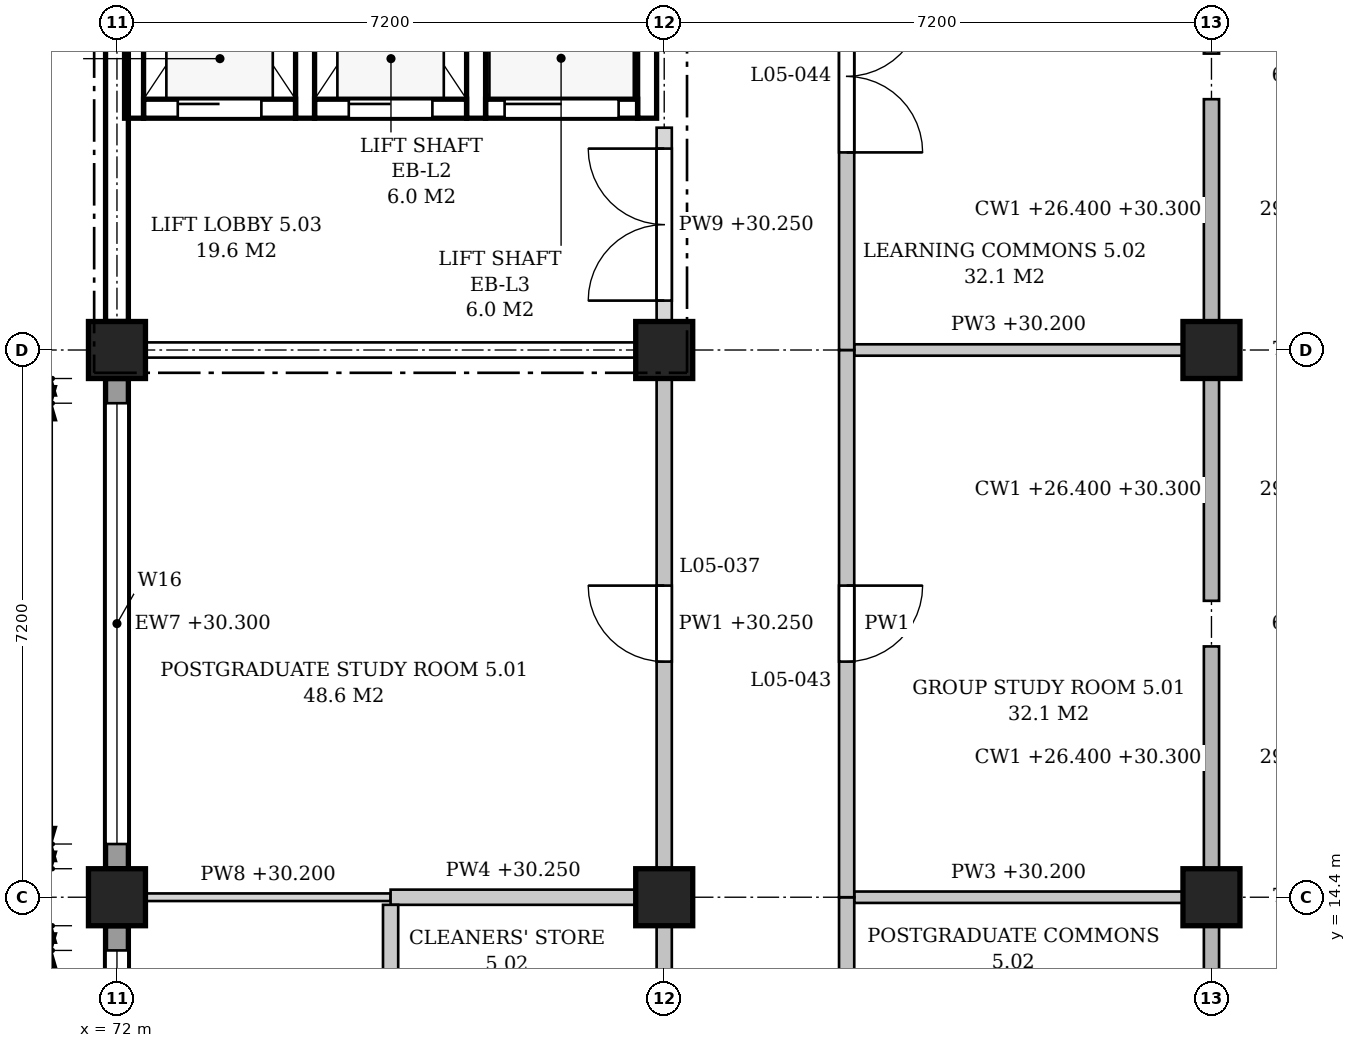
"""IFC4 building model, lengths in metres.
Left out: names, types, materials, properties, quantities, classifications, styles, units other than length and angle.
Written with IfcOpenShell. Run it as: python <this file> out.ifc"""

import sys

from ifc_helpers import new_model, si_unit, direction, frame, frame_2d, origin, origin_2d, place, context, subcontext, project, spatial, polyline, rectangle, outline, extrude, element, fill, save


model = new_model("IFC4")
c1 = context("Model", 3, precision=1e-05, world=origin(), true_north=direction((0.0, 1.0)))
c2 = subcontext(c1, "Body", "Model", "MODEL_VIEW")
j1 = project(units=[si_unit("LENGTHUNIT", "METRE"), si_unit("PLANEANGLEUNIT", "RADIAN")], contexts=[c1])
p1 = place(None, origin())
s1 = spatial("IfcSite", under=j1, at=p1, CompositionType="ELEMENT")
p2 = place(p1, origin())
s2 = spatial("IfcBuilding", under=s1, at=p2, CompositionType="ELEMENT")
p3 = place(p2, frame((0.0, 0.0, 26.4)))
s3 = spatial("IfcBuildingStorey", under=s2, at=p3, CompositionType="ELEMENT", Elevation=26.4)
for number, where, z_axis, x_axis in (
    (1, (72.0, 14.4, 0.0), (0.0, 0.0, 1.0), (1.0, 0.0, 0.0)),
    (2, (72.0, 21.6, 0.0), (0.0, 0.0, 1.0), (1.0, 0.0, 0.0)),
    (3, (79.2, 14.4, 0.0), (0.0, 0.0, 1.0), (1.0, 0.0, 0.0)),
    (4, (79.2, 21.6, 0.0), (0.0, 0.0, 1.0), (1.0, 0.0, 0.0)),
    (5, (86.4, 14.4, 0.0), (0.0, 0.0, 1.0), (1.0, 0.0, 0.0)),
    (6, (86.4, 21.6, 0.0), (0.0, 0.0, 1.0), (1.0, 0.0, 0.0)),
):
    element("IfcColumn", number, at=place(p3, frame(where, z_axis=z_axis, x_axis=x_axis)), inside=s3, PredefinedType="COLUMN", context=c2, shape_type="SweptSolid", body=[
        extrude(rectangle(XDim=0.75, YDim=0.75, at=origin_2d()), origin(), (0.0, 0.0, 1.0), 4.8),
    ])
p4 = place(p3, frame((72.0, 7.575, 0.0), z_axis=(0.0, 0.0, 1.0), x_axis=(0.0, 1.0, 0.0)))
e7 = element("IfcWall", 7, at=p4, inside=s3, PredefinedType="STANDARD", context=c2, shape_type="SweptSolid", body=[
    extrude(rectangle(XDim=6.45, YDim=0.3, at=frame_2d((3.225, 0.0))), origin(), (0.0, 0.0, 1.0), 3.9),
])
p5 = place(p4, frame((0.325, 0.0, 1.5)))
e8 = element("IfcOpeningElement", 8, at=p5, cuts=e7, PredefinedType="OPENING", context=c2, shape_type="SweptSolid", body=[
    extrude(outline(polyline([(0.0, 0.0), (5.8, 0.0), (5.8, 0.4), (2.9, 1.9), (0.0, 0.4), (0.0, 0.0)])), frame((0.0, 0.16, 0.0), z_axis=(0.0, -1.0, 0.0), x_axis=(1.0, 0.0, 0.0)), (0.0, 0.0, 1.0), 0.32),
])
p6 = place(p3, frame((72.0, 14.775, 0.0), z_axis=(0.0, 0.0, 1.0), x_axis=(0.0, 1.0, 0.0)))
e9 = element("IfcWall", 9, at=p6, inside=s3, PredefinedType="STANDARD", context=c2, shape_type="SweptSolid", body=[
    extrude(rectangle(XDim=6.45, YDim=0.3, at=frame_2d((3.225, 0.0))), origin(), (0.0, 0.0, 1.0), 3.9),
])
p7 = place(p6, frame((0.325, 0.0, 1.5)))
e10 = element("IfcOpeningElement", 10, at=p7, cuts=e9, PredefinedType="OPENING", context=c2, shape_type="SweptSolid", body=[
    extrude(outline(polyline([(0.0, 0.0), (5.8, 0.0), (5.8, 0.4), (2.9, 1.9), (0.0, 0.4), (0.0, 0.0)])), frame((0.0, 0.16, 0.0), z_axis=(0.0, -1.0, 0.0), x_axis=(1.0, 0.0, 0.0)), (0.0, 0.0, 1.0), 0.32),
])
p8 = place(p3, frame((72.0, 21.975, 0.0), z_axis=(0.0, 0.0, 1.0), x_axis=(0.0, 1.0, 0.0)))
e11 = element("IfcWall", 11, at=p8, inside=s3, PredefinedType="STANDARD", context=c2, shape_type="SweptSolid", body=[
    extrude(rectangle(XDim=6.45, YDim=0.3, at=frame_2d((3.225, 0.0))), origin(), (0.0, 0.0, 1.0), 3.9),
])
p9 = place(p3, frame((72.225, 24.65, -0.25), z_axis=(0.0, 0.0, 1.0), x_axis=(0.0, 1.0, 0.0)))
e12 = element("IfcWall", 12, at=p9, inside=s3, PredefinedType="SHEAR", context=c2, shape_type="SweptSolid", body=[
    extrude(rectangle(XDim=3.775, YDim=0.25, at=frame_2d((1.888, 0.0))), origin(), (0.0, 0.0, 1.0), 4.75),
])
for number, where, z_axis, x_axis in (
    (13, (74.475, 24.65, -0.25), (0.0, 0.0, 1.0), (0.0, 1.0, 0.0)),
    (14, (76.725, 24.65, -0.25), (0.0, 0.0, 1.0), (0.0, 1.0, 0.0)),
):
    element("IfcWall", number, at=place(p3, frame(where, z_axis=z_axis, x_axis=x_axis)), inside=s3, PredefinedType="SHEAR", context=c2, shape_type="SweptSolid", body=[
        extrude(rectangle(XDim=3.5, YDim=0.25, at=frame_2d((1.75, 0.0))), origin(), (0.0, 0.0, 1.0), 4.75),
    ])
p10 = place(p3, frame((78.975, 24.65, -0.25), z_axis=(0.0, 0.0, 1.0), x_axis=(0.0, 1.0, 0.0)))
e15 = element("IfcWall", 15, at=p10, inside=s3, PredefinedType="SHEAR", context=c2, shape_type="SweptSolid", body=[
    extrude(rectangle(XDim=3.775, YDim=0.25, at=frame_2d((1.888, 0.0))), origin(), (0.0, 0.0, 1.0), 4.75),
])
p11 = place(p3, frame((72.35, 24.775, -0.25), z_axis=(0.0, 0.0, 1.0), x_axis=(1.0, 0.0, 0.0)))
e16 = element("IfcWall", 16, at=p11, inside=s3, PredefinedType="SHEAR", context=c2, shape_type="SweptSolid", body=[
    extrude(rectangle(XDim=2.0, YDim=0.25, at=frame_2d((1.0, 0.0))), origin(), (0.0, 0.0, 1.0), 4.75),
])
p12 = place(p11, frame((0.45, 0.0, 0.25)))
e17 = element("IfcOpeningElement", 17, at=p12, cuts=e16, PredefinedType="OPENING", context=c2, shape_type="SweptSolid", body=[
    extrude(rectangle(XDim=1.1, YDim=2.1, at=frame_2d((0.55, 1.05))), frame((0.0, 0.135, 0.0), z_axis=(0.0, -1.0, 0.0), x_axis=(1.0, 0.0, 0.0)), (0.0, 0.0, 1.0), 0.27),
])
p13 = place(p3, frame((74.6, 24.775, -0.25), z_axis=(0.0, 0.0, 1.0), x_axis=(1.0, 0.0, 0.0)))
e18 = element("IfcWall", 18, at=p13, inside=s3, PredefinedType="SHEAR", context=c2, shape_type="SweptSolid", body=[
    extrude(rectangle(XDim=2.0, YDim=0.25, at=frame_2d((1.0, 0.0))), origin(), (0.0, 0.0, 1.0), 4.75),
])
p14 = place(p13, frame((0.45, 0.0, 0.25)))
e19 = element("IfcOpeningElement", 19, at=p14, cuts=e18, PredefinedType="OPENING", context=c2, shape_type="SweptSolid", body=[
    extrude(rectangle(XDim=1.1, YDim=2.1, at=frame_2d((0.55, 1.05))), frame((0.0, 0.135, 0.0), z_axis=(0.0, -1.0, 0.0), x_axis=(1.0, 0.0, 0.0)), (0.0, 0.0, 1.0), 0.27),
])
p15 = place(p3, frame((76.85, 24.775, -0.25), z_axis=(0.0, 0.0, 1.0), x_axis=(1.0, 0.0, 0.0)))
e20 = element("IfcWall", 20, at=p15, inside=s3, PredefinedType="SHEAR", context=c2, shape_type="SweptSolid", body=[
    extrude(rectangle(XDim=2.0, YDim=0.25, at=frame_2d((1.0, 0.0))), origin(), (0.0, 0.0, 1.0), 4.75),
])
p16 = place(p15, frame((0.25, 0.0, 0.25)))
e21 = element("IfcOpeningElement", 21, at=p16, cuts=e20, PredefinedType="OPENING", context=c2, shape_type="SweptSolid", body=[
    extrude(rectangle(XDim=1.5, YDim=2.1, at=frame_2d((0.75, 1.05))), frame((0.0, 0.135, 0.0), z_axis=(0.0, -1.0, 0.0), x_axis=(1.0, 0.0, 0.0)), (0.0, 0.0, 1.0), 0.27),
])
p17 = place(p3, frame((72.375, 14.4, 0.0), z_axis=(0.0, 0.0, 1.0), x_axis=(1.0, 0.0, 0.0)))
e22 = element("IfcWall", 22, at=p17, inside=s3, PredefinedType="PARTITIONING", context=c2, shape_type="SweptSolid", body=[
    extrude(rectangle(XDim=3.225, YDim=0.1, at=frame_2d((1.613, 0.0))), origin(), (0.0, 0.0, 1.0), 3.8),
])
p18 = place(p3, frame((75.6, 14.4, 0.0), z_axis=(0.0, 0.0, 1.0), x_axis=(1.0, 0.0, 0.0)))
e23 = element("IfcWall", 23, at=p18, inside=s3, PredefinedType="PARTITIONING", context=c2, shape_type="SweptSolid", body=[
    extrude(rectangle(XDim=3.225, YDim=0.2, at=frame_2d((1.612, 0.0))), origin(), (0.0, 0.0, 1.0), 3.85),
])
p19 = place(p3, frame((81.7, 14.4, 0.0), z_axis=(0.0, 0.0, 1.0), x_axis=(1.0, 0.0, 0.0)))
e24 = element("IfcWall", 24, at=p19, inside=s3, PredefinedType="PARTITIONING", context=c2, shape_type="SweptSolid", body=[
    extrude(rectangle(XDim=4.325, YDim=0.15, at=frame_2d((2.163, 0.0))), origin(), (0.0, 0.0, 1.0), 3.8),
])
p20 = place(p3, frame((72.375, 21.6, 0.0), z_axis=(0.0, 0.0, 1.0), x_axis=(1.0, 0.0, 0.0)))
e25 = element("IfcWall", 25, at=p20, inside=s3, PredefinedType="PARTITIONING", context=c2, shape_type="SweptSolid", body=[
    extrude(rectangle(XDim=6.45, YDim=0.2, at=frame_2d((3.225, 0.0))), origin(), (0.0, 0.0, 1.0), 3.85),
])
p21 = place(p3, frame((81.7, 21.6, 0.0), z_axis=(0.0, 0.0, 1.0), x_axis=(1.0, 0.0, 0.0)))
e26 = element("IfcWall", 26, at=p21, inside=s3, PredefinedType="PARTITIONING", context=c2, shape_type="SweptSolid", body=[
    extrude(rectangle(XDim=4.325, YDim=0.15, at=frame_2d((2.163, 0.0))), origin(), (0.0, 0.0, 1.0), 3.8),
])
p22 = place(p3, frame((75.6, 10.9, 0.0), z_axis=(0.0, 0.0, 1.0), x_axis=(0.0, 1.0, 0.0)))
e27 = element("IfcWall", 27, at=p22, inside=s3, PredefinedType="PARTITIONING", context=c2, shape_type="SweptSolid", body=[
    extrude(outline(polyline([(0.0, 0.0), (3.4, 0.0), (3.4, 3.85), (3.275, 3.85), (3.275, 4.5), (0.0, 4.5), (0.0, 0.0)])), frame((0.0, 0.1, 0.0), z_axis=(0.0, -1.0, 0.0), x_axis=(1.0, 0.0, 0.0)), (0.0, 0.0, 1.0), 0.2),
])
p23 = place(p3, frame((79.2, 10.9, 0.0), z_axis=(0.0, 0.0, 1.0), x_axis=(0.0, 1.0, 0.0)))
e28 = element("IfcWall", 28, at=p23, inside=s3, PredefinedType="PARTITIONING", context=c2, shape_type="SweptSolid", body=[
    extrude(rectangle(XDim=3.125, YDim=0.2, at=frame_2d((1.562, 0.0))), origin(), (0.0, 0.0, 1.0), 3.85),
])
p24 = place(p3, frame((79.2, 14.775, 0.0), z_axis=(0.0, 0.0, 1.0), x_axis=(0.0, 1.0, 0.0)))
e29 = element("IfcWall", 29, at=p24, inside=s3, PredefinedType="PARTITIONING", context=c2, shape_type="SweptSolid", body=[
    extrude(rectangle(XDim=6.45, YDim=0.2, at=frame_2d((3.225, 0.0))), origin(), (0.0, 0.0, 1.0), 3.85),
])
p25 = place(p24, frame((2.725, 0.0, 0.0)))
e30 = element("IfcOpeningElement", 30, at=p25, cuts=e29, PredefinedType="OPENING", context=c2, shape_type="SweptSolid", body=[
    extrude(rectangle(XDim=1.0, YDim=2.1, at=frame_2d((0.5, 1.05))), frame((0.0, 0.11, 0.0), z_axis=(0.0, -1.0, 0.0), x_axis=(1.0, 0.0, 0.0)), (0.0, 0.0, 1.0), 0.22),
])
p26 = place(p3, frame((79.2, 21.975, 0.0), z_axis=(0.0, 0.0, 1.0), x_axis=(0.0, 1.0, 0.0)))
e31 = element("IfcWall", 31, at=p26, inside=s3, PredefinedType="PARTITIONING", context=c2, shape_type="SweptSolid", body=[
    extrude(rectangle(XDim=2.55, YDim=0.2, at=frame_2d((1.275, 0.0))), origin(), (0.0, 0.0, 1.0), 3.85),
])
p27 = place(p26, frame((0.275, 0.0, 0.0)))
e32 = element("IfcOpeningElement", 32, at=p27, cuts=e31, PredefinedType="OPENING", context=c2, shape_type="SweptSolid", body=[
    extrude(rectangle(XDim=2.0, YDim=2.4, at=frame_2d((1.0, 1.2))), frame((0.0, 0.11, 0.0), z_axis=(0.0, -1.0, 0.0), x_axis=(1.0, 0.0, 0.0)), (0.0, 0.0, 1.0), 0.22),
])
p28 = place(p3, frame((81.6, 7.325, 0.0), z_axis=(0.0, 0.0, 1.0), x_axis=(0.0, 1.0, 0.0)))
e33 = element("IfcWall", 33, at=p28, inside=s3, PredefinedType="PARTITIONING", context=c2, shape_type="SweptSolid", body=[
    extrude(outline(polyline([(0.0, 0.0), (7.075, 0.0), (7.075, 3.85), (6.85, 3.85), (6.85, 4.5), (0.1, 4.5), (0.1, 3.85), (0.0, 3.85), (0.0, 0.0)])), frame((0.0, 0.1, 0.0), z_axis=(0.0, -1.0, 0.0), x_axis=(1.0, 0.0, 0.0)), (0.0, 0.0, 1.0), 0.2),
])
p29 = place(p28, frame((2.537, 0.0, 0.0)))
e34 = element("IfcOpeningElement", 34, at=p29, cuts=e33, PredefinedType="OPENING", context=c2, shape_type="SweptSolid", body=[
    extrude(rectangle(XDim=2.0, YDim=2.1, at=frame_2d((1.0, 1.05))), frame((0.0, 0.11, 0.0), z_axis=(0.0, -1.0, 0.0), x_axis=(1.0, 0.0, 0.0)), (0.0, 0.0, 1.0), 0.22),
])
p30 = place(p3, frame((81.6, 14.4, 0.0), z_axis=(0.0, 0.0, 1.0), x_axis=(0.0, 1.0, 0.0)))
e35 = element("IfcWall", 35, at=p30, inside=s3, PredefinedType="PARTITIONING", context=c2, shape_type="SweptSolid", body=[
    extrude(outline(polyline([(0.0, 0.0), (7.2, 0.0), (7.2, 3.85), (6.975, 3.85), (6.975, 4.5), (0.225, 4.5), (0.225, 3.85), (0.0, 3.85), (0.0, 0.0)])), frame((0.0, 0.1, 0.0), z_axis=(0.0, -1.0, 0.0), x_axis=(1.0, 0.0, 0.0)), (0.0, 0.0, 1.0), 0.2),
])
p31 = place(p30, frame((3.1, 0.0, 0.0)))
e36 = element("IfcOpeningElement", 36, at=p31, cuts=e35, PredefinedType="OPENING", context=c2, shape_type="SweptSolid", body=[
    extrude(rectangle(XDim=1.0, YDim=2.1, at=frame_2d((0.5, 1.05))), frame((0.0, 0.11, 0.0), z_axis=(0.0, -1.0, 0.0), x_axis=(1.0, 0.0, 0.0)), (0.0, 0.0, 1.0), 0.22),
])
p32 = place(p3, frame((81.6, 21.6, 0.0), z_axis=(0.0, 0.0, 1.0), x_axis=(0.0, 1.0, 0.0)))
e37 = element("IfcWall", 37, at=p32, inside=s3, PredefinedType="PARTITIONING", context=c2, shape_type="SweptSolid", body=[
    extrude(outline(polyline([(0.0, 0.0), (7.2, 0.0), (7.2, 3.85), (6.975, 3.85), (6.975, 4.5), (0.225, 4.5), (0.225, 3.85), (0.0, 3.85), (0.0, 0.0)])), frame((0.0, 0.1, 0.0), z_axis=(0.0, -1.0, 0.0), x_axis=(1.0, 0.0, 0.0)), (0.0, 0.0, 1.0), 0.2),
])
p33 = place(p32, frame((2.6, 0.0, 0.0)))
e38 = element("IfcOpeningElement", 38, at=p33, cuts=e37, PredefinedType="OPENING", context=c2, shape_type="SweptSolid", body=[
    extrude(rectangle(XDim=2.0, YDim=2.1, at=frame_2d((1.0, 1.05))), frame((0.0, 0.11, 0.0), z_axis=(0.0, -1.0, 0.0), x_axis=(1.0, 0.0, 0.0)), (0.0, 0.0, 1.0), 0.22),
])
p34 = place(p5, origin())
e39 = element("IfcWindow", 39, at=p34, inside=s3, PartitioningType="TRIPLE_PANEL_VERTICAL", PredefinedType="WINDOW", context=c2, shape_type="SweptSolid", body=[
    extrude(outline(polyline([(0.0, 0.0), (5.8, 0.0), (5.8, 0.4), (2.9, 1.9), (0.0, 0.4), (0.0, 0.0)])), frame((0.0, 0.03, 0.0), z_axis=(0.0, -1.0, 0.0), x_axis=(1.0, 0.0, 0.0)), (0.0, 0.0, 1.0), 0.06),
])
fill(e8, e39)
p35 = place(p7, origin())
e40 = element("IfcWindow", 40, at=p35, inside=s3, PartitioningType="TRIPLE_PANEL_VERTICAL", PredefinedType="WINDOW", context=c2, shape_type="SweptSolid", body=[
    extrude(outline(polyline([(0.0, 0.0), (5.8, 0.0), (5.8, 0.4), (2.9, 1.9), (0.0, 0.4), (0.0, 0.0)])), frame((0.0, 0.03, 0.0), z_axis=(0.0, -1.0, 0.0), x_axis=(1.0, 0.0, 0.0)), (0.0, 0.0, 1.0), 0.06),
])
fill(e10, e40)
p36 = place(p12, origin())
e41 = element("IfcDoor", 41, at=p36, inside=s3, OperationType="SLIDING_TO_LEFT", PredefinedType="DOOR", context=c2, shape_type="SweptSolid", body=[
    extrude(rectangle(XDim=1.1, YDim=2.1, at=frame_2d((0.55, 1.05))), frame((0.0, 0.025, 0.0), z_axis=(0.0, -1.0, 0.0), x_axis=(1.0, 0.0, 0.0)), (0.0, 0.0, 1.0), 0.05),
])
fill(e17, e41)
p37 = place(p14, origin())
e42 = element("IfcDoor", 42, at=p37, inside=s3, OperationType="SLIDING_TO_LEFT", PredefinedType="DOOR", context=c2, shape_type="SweptSolid", body=[
    extrude(rectangle(XDim=1.1, YDim=2.1, at=frame_2d((0.55, 1.05))), frame((0.0, 0.025, 0.0), z_axis=(0.0, -1.0, 0.0), x_axis=(1.0, 0.0, 0.0)), (0.0, 0.0, 1.0), 0.05),
])
fill(e19, e42)
p38 = place(p16, origin())
e43 = element("IfcDoor", 43, at=p38, inside=s3, OperationType="SLIDING_TO_LEFT", PredefinedType="DOOR", context=c2, shape_type="SweptSolid", body=[
    extrude(rectangle(XDim=1.5, YDim=2.1, at=frame_2d((0.75, 1.05))), frame((0.0, 0.025, 0.0), z_axis=(0.0, -1.0, 0.0), x_axis=(1.0, 0.0, 0.0)), (0.0, 0.0, 1.0), 0.05),
])
fill(e21, e43)
p39 = place(p27, origin())
e44 = element("IfcDoor", 44, at=p39, inside=s3, OperationType="DOUBLE_DOOR_SINGLE_SWING", PredefinedType="DOOR", context=c2, shape_type="SweptSolid", body=[
    extrude(rectangle(XDim=2.0, YDim=2.4, at=frame_2d((1.0, 1.2))), frame((0.0, 0.025, 0.0), z_axis=(0.0, -1.0, 0.0), x_axis=(1.0, 0.0, 0.0)), (0.0, 0.0, 1.0), 0.05),
])
fill(e32, e44)
p40 = place(p25, origin())
e45 = element("IfcDoor", 45, at=p40, inside=s3, OperationType="SINGLE_SWING_RIGHT", PredefinedType="DOOR", context=c2, shape_type="SweptSolid", body=[
    extrude(rectangle(XDim=1.0, YDim=2.1, at=frame_2d((0.5, 1.05))), frame((0.0, 0.025, 0.0), z_axis=(0.0, -1.0, 0.0), x_axis=(1.0, 0.0, 0.0)), (0.0, 0.0, 1.0), 0.05),
])
fill(e30, e45)
p41 = place(p31, frame((1.0, 0.0, 0.0), z_axis=(0.0, 0.0, 1.0), x_axis=(-1.0, 0.0, 0.0)))
e46 = element("IfcDoor", 46, at=p41, inside=s3, OperationType="SINGLE_SWING_LEFT", PredefinedType="DOOR", context=c2, shape_type="SweptSolid", body=[
    extrude(rectangle(XDim=1.0, YDim=2.1, at=frame_2d((0.5, 1.05))), frame((0.0, 0.025, 0.0), z_axis=(0.0, -1.0, 0.0), x_axis=(1.0, 0.0, 0.0)), (0.0, 0.0, 1.0), 0.05),
])
fill(e36, e46)
p42 = place(p33, origin())
e47 = element("IfcDoor", 47, at=p42, inside=s3, OperationType="DOUBLE_DOOR_SINGLE_SWING", PredefinedType="DOOR", context=c2, shape_type="SweptSolid", body=[
    extrude(rectangle(XDim=2.0, YDim=2.1, at=frame_2d((1.0, 1.05))), frame((0.0, 0.025, 0.0), z_axis=(0.0, -1.0, 0.0), x_axis=(1.0, 0.0, 0.0)), (0.0, 0.0, 1.0), 0.05),
])
fill(e38, e47)
save(model, sys.argv[1])
